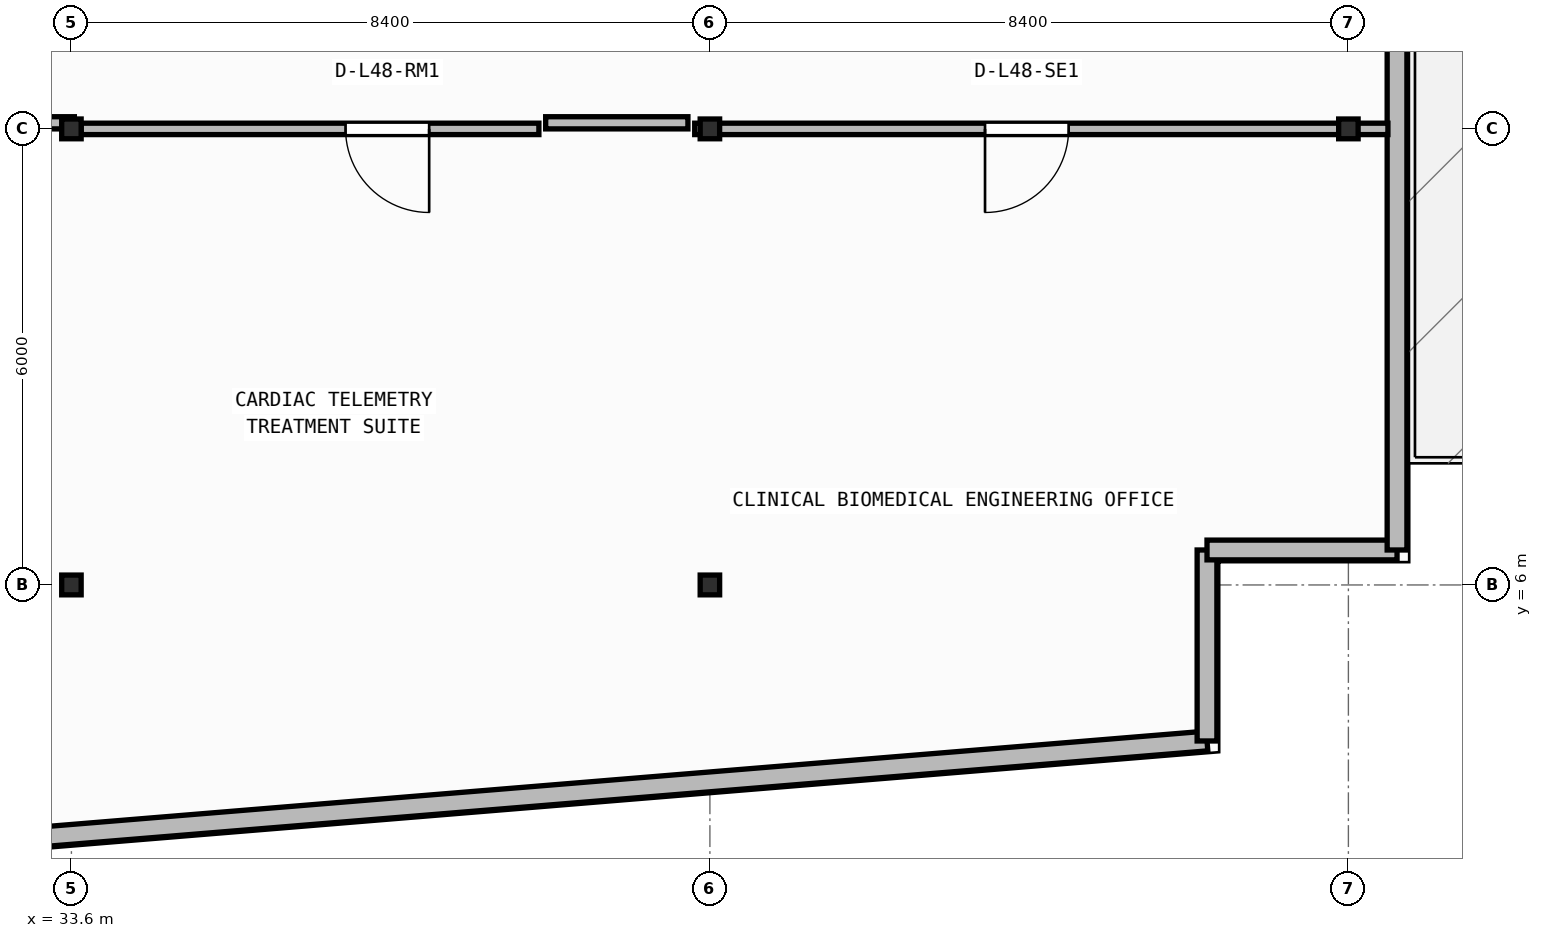
"""IFC4 building model, lengths in metres.
Left out: names, types, materials, properties, quantities, classifications, styles, units other than length and angle.
Written with IfcOpenShell. Run it as: python <this file> out.ifc"""

import sys

from ifc_helpers import new_model, si_unit, direction, frame, frame_2d, origin, origin_2d, place, context, subcontext, project, spatial, rectangle, i_section, extrude, element, fill, save


model = new_model("IFC4")
c1 = context("Model", 3, precision=1e-05, world=origin(), true_north=direction((0.0, 1.0)))
c2 = subcontext(c1, "Body", "Model", "MODEL_VIEW")
j1 = project(units=[si_unit("LENGTHUNIT", "METRE"), si_unit("PLANEANGLEUNIT", "RADIAN")], contexts=[c1])
p1 = place(None, origin())
s1 = spatial("IfcSite", under=j1, at=p1, CompositionType="ELEMENT")
p2 = place(p1, origin())
s2 = spatial("IfcBuilding", under=s1, at=p2, CompositionType="ELEMENT")
p3 = place(p2, frame((0.0, 0.0, 196.05)))
s3 = spatial("IfcBuildingStorey", under=s2, at=p3, CompositionType="ELEMENT", Elevation=196.05)
for number, where, z_axis, x_axis in (
    (1, (33.6, 6.0, 0.0), (0.0, 0.0, 1.0), (1.0, 0.0, 0.0)),
    (2, (42.0, 6.0, 0.0), (0.0, 0.0, 1.0), (1.0, 0.0, 0.0)),
    (3, (33.6, 12.0, 0.0), (0.0, 0.0, 1.0), (1.0, 0.0, 0.0)),
    (4, (42.0, 12.0, 0.0), (0.0, 0.0, 1.0), (1.0, 0.0, 0.0)),
    (5, (50.4, 12.0, 0.0), (0.0, 0.0, 1.0), (1.0, 0.0, 0.0)),
):
    element("IfcColumn", number, at=place(p3, frame(where, z_axis=z_axis, x_axis=x_axis)), inside=s3, PredefinedType="COLUMN", context=c2, shape_type="SweptSolid", body=[
        extrude(i_section(OverallWidth=0.256, OverallDepth=0.26, WebThickness=0.01, FlangeThickness=0.017, FilletRadius=0.013, at=origin_2d()), origin(), (0.0, 0.0, 1.0), 3.95),
    ])
p4 = place(p3, frame((2.66, 0.174, 0.0), z_axis=(0.0, 0.0, 1.0), x_axis=(0.996634028439, 0.081979347142, 0.0)))
e6 = element("IfcWall", 6, at=p4, inside=s3, PredefinedType="STANDARD", context=c2, shape_type="SweptSolid", body=[
    extrude(rectangle(XDim=46.035, YDim=0.26, at=frame_2d((23.018, 0.0))), origin(), (0.0, 0.0, 1.0), 3.71),
])
p5 = place(p4, frame((21.817, 0.0, 0.9)))
e7 = element("IfcOpeningElement", 7, at=p5, cuts=e6, PredefinedType="OPENING", context=c2, shape_type="SweptSolid", body=[
    extrude(rectangle(XDim=2.4, YDim=1.65, at=frame_2d((1.2, 0.825))), frame((0.0, 0.14, 0.0), z_axis=(0.0, -1.0, 0.0), x_axis=(1.0, 0.0, 0.0)), (0.0, 0.0, 1.0), 0.28),
])
p6 = place(p3, frame((48.54, 3.948, 0.0), z_axis=(0.0, 0.0, 1.0), x_axis=(0.0, 1.0, 0.0)))
e8 = element("IfcWall", 8, at=p6, inside=s3, PredefinedType="STANDARD", context=c2, shape_type="SweptSolid", body=[
    extrude(rectangle(XDim=2.512, YDim=0.26, at=frame_2d((1.256, 0.0))), origin(), (0.0, 0.0, 1.0), 3.71),
])
p7 = place(p3, frame((48.54, 6.46, 0.0), z_axis=(0.0, 0.0, 1.0), x_axis=(1.0, 0.0, 0.0)))
e9 = element("IfcWall", 9, at=p7, inside=s3, PredefinedType="STANDARD", context=c2, shape_type="SweptSolid", body=[
    extrude(rectangle(XDim=2.5, YDim=0.26, at=frame_2d((1.25, 0.0))), origin(), (0.0, 0.0, 1.0), 3.71),
])
p8 = place(p3, frame((51.04, 6.46, 0.0), z_axis=(0.0, 0.0, 1.0), x_axis=(0.0, 1.0, 0.0)))
e10 = element("IfcWall", 10, at=p8, inside=s3, PredefinedType="STANDARD", context=c2, shape_type="SweptSolid", body=[
    extrude(rectangle(XDim=22.68, YDim=0.26, at=frame_2d((11.34, 0.0))), origin(), (0.0, 0.0, 1.0), 3.71),
])
p9 = place(p8, frame((10.69, 0.0, 0.0)))
e11 = element("IfcOpeningElement", 11, at=p9, cuts=e10, PredefinedType="OPENING", context=c2, shape_type="SweptSolid", body=[
    extrude(rectangle(XDim=1.3, YDim=2.15, at=frame_2d((0.65, 1.075))), frame((0.0, 0.14, 0.0), z_axis=(0.0, -1.0, 0.0), x_axis=(1.0, 0.0, 0.0)), (0.0, 0.0, 1.0), 0.28),
])
p10 = place(p3, frame((39.75, 12.0, 0.0), z_axis=(0.0, 0.0, 1.0), x_axis=(-1.0, 0.0, 0.0)))
e12 = element("IfcWall", 12, at=p10, inside=s3, PredefinedType="PARTITIONING", context=c2, shape_type="SweptSolid", body=[
    extrude(rectangle(XDim=6.022, YDim=0.15, at=frame_2d((3.011, 0.0))), origin(), (0.0, 0.0, 1.0), 3.152),
])
p11 = place(p10, frame((1.444, 0.0, 0.0)))
e13 = element("IfcOpeningElement", 13, at=p11, cuts=e12, PredefinedType="OPENING", context=c2, shape_type="SweptSolid", body=[
    extrude(rectangle(XDim=1.1, YDim=2.1, at=frame_2d((0.55, 1.05))), frame((0.0, 0.085, 0.0), z_axis=(0.0, -1.0, 0.0), x_axis=(1.0, 0.0, 0.0)), (0.0, 0.0, 1.0), 0.17),
])
p12 = place(p3, frame((50.92, 12.0, 0.0), z_axis=(0.0, 0.0, 1.0), x_axis=(-1.0, 0.0, 0.0)))
e14 = element("IfcWall", 14, at=p12, inside=s3, PredefinedType="PARTITIONING", context=c2, shape_type="SweptSolid", body=[
    extrude(rectangle(XDim=9.12, YDim=0.15, at=frame_2d((4.56, 0.0))), origin(), (0.0, 0.0, 1.0), 3.152),
])
p13 = place(p12, frame((4.2, 0.0, 0.0)))
e15 = element("IfcOpeningElement", 15, at=p13, cuts=e14, PredefinedType="OPENING", context=c2, shape_type="SweptSolid", body=[
    extrude(rectangle(XDim=1.1, YDim=2.1, at=frame_2d((0.55, 1.05))), frame((0.0, 0.085, 0.0), z_axis=(0.0, -1.0, 0.0), x_axis=(1.0, 0.0, 0.0)), (0.0, 0.0, 1.0), 0.17),
])
p14 = place(p3, frame((31.439, 12.08, 0.0), z_axis=(0.0, 0.0, 1.0), x_axis=(1.0, 0.0, 0.0)))
e16 = element("IfcWall", 16, at=p14, inside=s3, PredefinedType="PARTITIONING", context=c2, shape_type="SweptSolid", body=[
    extrude(rectangle(XDim=2.199, YDim=0.16, at=frame_2d((1.1, 0.0))), origin(), (0.0, 0.0, 1.0), 3.152),
])
p15 = place(p3, frame((39.839, 12.08, 0.0), z_axis=(0.0, 0.0, 1.0), x_axis=(1.0, 0.0, 0.0)))
e17 = element("IfcWall", 17, at=p15, inside=s3, PredefinedType="PARTITIONING", context=c2, shape_type="SweptSolid", body=[
    extrude(rectangle(XDim=1.871, YDim=0.16, at=frame_2d((0.936, 0.0))), origin(), (0.0, 0.0, 1.0), 3.152),
])
p16 = place(p11, origin())
e18 = element("IfcDoor", 18, at=p16, inside=s3, OperationType="SINGLE_SWING_LEFT", PredefinedType="DOOR", context=c2, shape_type="SweptSolid", body=[
    extrude(rectangle(XDim=1.1, YDim=2.1, at=frame_2d((0.55, 1.05))), frame((0.0, 0.025, 0.0), z_axis=(0.0, -1.0, 0.0), x_axis=(1.0, 0.0, 0.0)), (0.0, 0.0, 1.0), 0.05),
])
fill(e13, e18)
p17 = place(p13, origin())
e19 = element("IfcDoor", 19, at=p17, inside=s3, OperationType="SINGLE_SWING_RIGHT", PredefinedType="DOOR", context=c2, shape_type="SweptSolid", body=[
    extrude(rectangle(XDim=1.1, YDim=2.1, at=frame_2d((0.55, 1.05))), frame((0.0, 0.025, 0.0), z_axis=(0.0, -1.0, 0.0), x_axis=(1.0, 0.0, 0.0)), (0.0, 0.0, 1.0), 0.05),
])
fill(e15, e19)
save(model, sys.argv[1])
